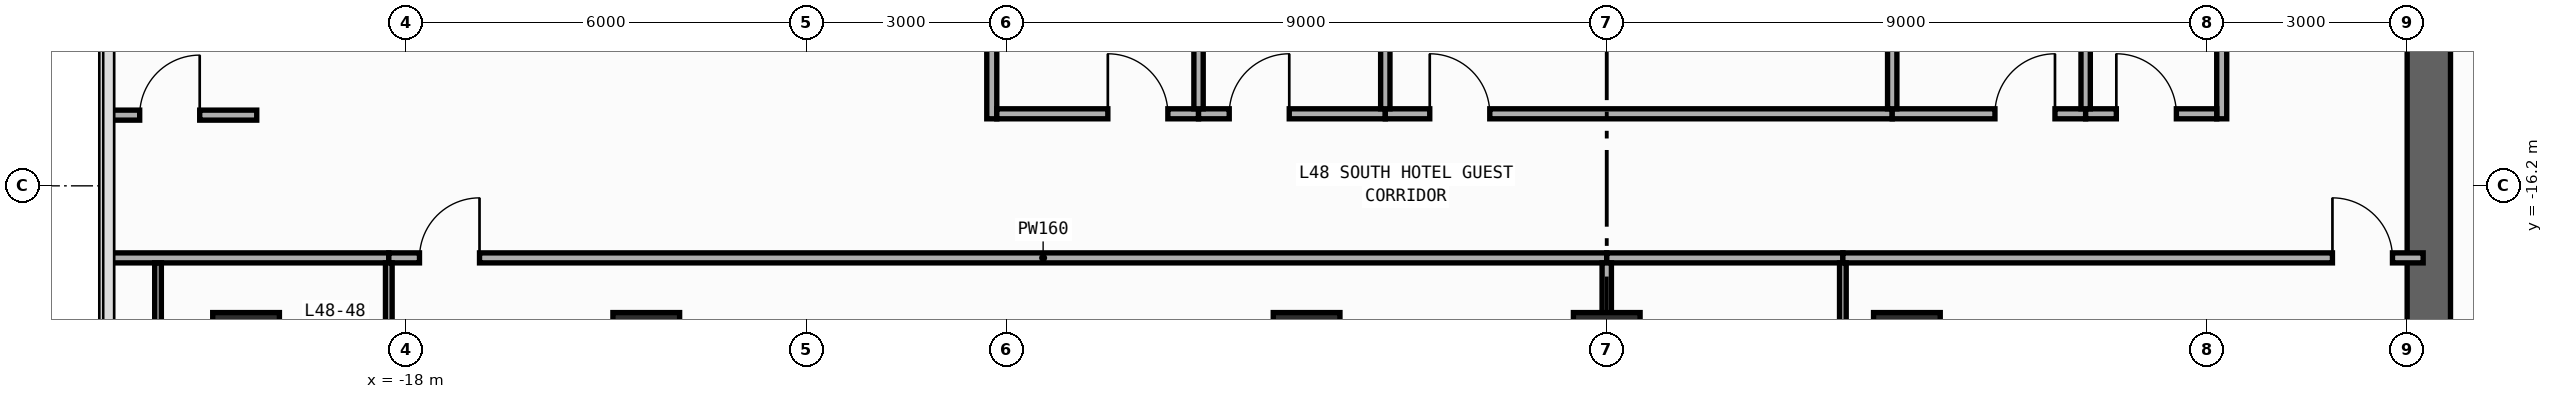
"""IFC4 building model, lengths in metres.
Left out: names, types, materials, properties, quantities, classifications, styles, units other than length and angle.
Written with IfcOpenShell. Run it as: python <this file> out.ifc"""

import sys

from ifc_helpers import new_model, si_unit, direction, frame, frame_2d, origin, origin_2d, place, context, subcontext, project, spatial, rectangle, extrude, element, fill, save


model = new_model("IFC4")
c1 = context("Model", 3, precision=1e-05, world=origin(), true_north=direction((0.0, 1.0)))
c2 = subcontext(c1, "Body", "Model", "MODEL_VIEW")
j1 = project(units=[si_unit("LENGTHUNIT", "METRE"), si_unit("PLANEANGLEUNIT", "RADIAN")], contexts=[c1])
p1 = place(None, origin())
s1 = spatial("IfcSite", under=j1, at=p1, CompositionType="ELEMENT")
p2 = place(p1, origin())
s2 = spatial("IfcBuilding", under=s1, at=p2, CompositionType="ELEMENT")
p3 = place(p2, frame((0.0, 0.0, 206.8)))
s3 = spatial("IfcBuildingStorey", under=s2, at=p3, CompositionType="ELEMENT", Elevation=206.8)
p4 = place(p3, frame((12.325, -19.8, 0.0), z_axis=(0.0, 0.0, 1.0), x_axis=(0.0, 1.0, 0.0)))
e1 = element("IfcWall", 1, at=p4, inside=s3, PredefinedType="SHEAR", context=c2, shape_type="SweptSolid", body=[
    extrude(rectangle(XDim=27.0, YDim=0.65, at=frame_2d((13.5, 0.0))), origin(), (0.0, 0.0, 1.0), 3.54),
])
p5 = place(p4, frame((23.05, 0.0, 0.0)))
e2 = element("IfcOpeningElement", 2, at=p5, cuts=e1, PredefinedType="OPENING", context=c2, shape_type="SweptSolid", body=[
    extrude(rectangle(XDim=1.1, YDim=2.2, at=frame_2d((0.55, 1.1))), frame((0.0, 0.335, 0.0), z_axis=(0.0, -1.0, 0.0), x_axis=(1.0, 0.0, 0.0)), (0.0, 0.0, 1.0), 0.67),
])
p6 = place(p4, frame((19.85, 0.0, 0.0)))
e3 = element("IfcOpeningElement", 3, at=p6, cuts=e1, PredefinedType="OPENING", context=c2, shape_type="SweptSolid", body=[
    extrude(rectangle(XDim=1.1, YDim=2.2, at=frame_2d((0.55, 1.1))), frame((0.0, 0.335, 0.0), z_axis=(0.0, -1.0, 0.0), x_axis=(1.0, 0.0, 0.0)), (0.0, 0.0, 1.0), 0.67),
])
p7 = place(p4, frame((16.65, 0.0, 0.0)))
e4 = element("IfcOpeningElement", 4, at=p7, cuts=e1, PredefinedType="OPENING", context=c2, shape_type="SweptSolid", body=[
    extrude(rectangle(XDim=1.1, YDim=2.2, at=frame_2d((0.55, 1.1))), frame((0.0, 0.335, 0.0), z_axis=(0.0, -1.0, 0.0), x_axis=(1.0, 0.0, 0.0)), (0.0, 0.0, 1.0), 0.67),
])
p8 = place(p4, frame((7.175, 0.0, 0.0)))
e5 = element("IfcOpeningElement", 5, at=p8, cuts=e1, PredefinedType="OPENING", context=c2, shape_type="SweptSolid", body=[
    extrude(rectangle(XDim=0.85, YDim=2.1, at=frame_2d((0.425, 1.05))), frame((0.0, 0.335, 0.0), z_axis=(0.0, -1.0, 0.0), x_axis=(1.0, 0.0, 0.0)), (0.0, 0.0, 1.0), 0.67),
])
p9 = place(p4, frame((10.375, 0.0, 0.0)))
e6 = element("IfcOpeningElement", 6, at=p9, cuts=e1, PredefinedType="OPENING", context=c2, shape_type="SweptSolid", body=[
    extrude(rectangle(XDim=0.85, YDim=2.1, at=frame_2d((0.425, 1.05))), frame((0.0, 0.335, 0.0), z_axis=(0.0, -1.0, 0.0), x_axis=(1.0, 0.0, 0.0)), (0.0, 0.0, 1.0), 0.67),
])
p10 = place(p4, frame((12.725, 0.0, 0.0)))
e7 = element("IfcOpeningElement", 7, at=p10, cuts=e1, PredefinedType="OPENING", context=c2, shape_type="SweptSolid", body=[
    extrude(rectangle(XDim=1.15, YDim=2.2, at=frame_2d((0.575, 1.1))), frame((0.0, 0.335, 0.0), z_axis=(0.0, -1.0, 0.0), x_axis=(1.0, 0.0, 0.0)), (0.0, 0.0, 1.0), 0.67),
])
p11 = place(p4, frame((25.125, 0.0, 0.0)))
e8 = element("IfcOpeningElement", 8, at=p11, cuts=e1, PredefinedType="OPENING", context=c2, shape_type="SweptSolid", body=[
    extrude(rectangle(XDim=0.85, YDim=2.1, at=frame_2d((0.425, 1.05))), frame((0.0, 0.335, 0.0), z_axis=(0.0, -1.0, 0.0), x_axis=(1.0, 0.0, 0.0)), (0.0, 0.0, 1.0), 0.67),
])
for number, where, z_axis, x_axis in (
    (9, (-20.4, -18.6, 0.0), (0.0, 0.0, 1.0), (1.0, 0.0, 0.0)),
    (10, (-14.4, -18.6, 0.0), (0.0, 0.0, 1.0), (1.0, 0.0, 0.0)),
    (11, (-4.5, -18.6, 0.0), (0.0, 0.0, 1.0), (1.0, 0.0, 0.0)),
    (12, (0.0, -18.6, 0.0), (0.0, 0.0, 1.0), (1.0, 0.0, 0.0)),
    (13, (4.5, -18.6, 0.0), (0.0, 0.0, 1.0), (1.0, 0.0, 0.0)),
):
    element("IfcColumn", number, at=place(p3, frame(where, z_axis=z_axis, x_axis=x_axis)), inside=s3, PredefinedType="COLUMN", context=c2, shape_type="SweptSolid", body=[
        extrude(rectangle(XDim=1.0, YDim=1.0, at=origin_2d()), origin(), (0.0, 0.0, 1.0), 3.8),
    ])
p12 = place(p3, frame((-9.22, -15.195, 0.0), z_axis=(0.0, 0.0, 1.0), x_axis=(0.0, 1.0, 0.0)))
e14 = element("IfcWall", 14, at=p12, inside=s3, PredefinedType="PARTITIONING", context=c2, shape_type="SweptSolid", body=[
    extrude(rectangle(XDim=19.395, YDim=0.15, at=frame_2d((9.698, 0.0))), origin(), (0.0, 0.0, 1.0), 2.952),
])
p13 = place(p12, frame((9.348, 0.0, 0.0)))
e15 = element("IfcOpeningElement", 15, at=p13, cuts=e14, PredefinedType="OPENING", context=c2, shape_type="SweptSolid", body=[
    extrude(rectangle(XDim=0.9, YDim=2.15, at=frame_2d((0.45, 1.075))), frame((0.0, 0.085, 0.0), z_axis=(0.0, -1.0, 0.0), x_axis=(1.0, 0.0, 0.0)), (0.0, 0.0, 1.0), 0.17),
])
p14 = place(p3, frame((9.22, -15.195, 0.0), z_axis=(0.0, 0.0, 1.0), x_axis=(0.0, 1.0, 0.0)))
e16 = element("IfcWall", 16, at=p14, inside=s3, PredefinedType="PARTITIONING", context=c2, shape_type="SweptSolid", body=[
    extrude(rectangle(XDim=19.395, YDim=0.15, at=frame_2d((9.698, 0.0))), origin(), (0.0, 0.0, 1.0), 2.952),
])
p15 = place(p14, frame((9.348, 0.0, 0.0)))
e17 = element("IfcOpeningElement", 17, at=p15, cuts=e16, PredefinedType="OPENING", context=c2, shape_type="SweptSolid", body=[
    extrude(rectangle(XDim=0.9, YDim=2.15, at=frame_2d((0.45, 1.075))), frame((0.0, 0.085, 0.0), z_axis=(0.0, -1.0, 0.0), x_axis=(1.0, 0.0, 0.0)), (0.0, 0.0, 1.0), 0.17),
])
p16 = place(p3, frame((-9.145, -15.12, 0.0), z_axis=(0.0, 0.0, 1.0), x_axis=(1.0, 0.0, 0.0)))
e18 = element("IfcWall", 18, at=p16, inside=s3, PredefinedType="PARTITIONING", context=c2, shape_type="SweptSolid", body=[
    extrude(rectangle(XDim=3.025, YDim=0.15, at=frame_2d((1.512, 0.0))), origin(), (0.0, 0.0, 1.0), 3.54),
])
p17 = place(p16, frame((1.665, 0.0, 0.0)))
e19 = element("IfcOpeningElement", 19, at=p17, cuts=e18, PredefinedType="OPENING", context=c2, shape_type="SweptSolid", body=[
    extrude(rectangle(XDim=0.9, YDim=2.15, at=frame_2d((0.45, 1.075))), frame((0.0, 0.085, 0.0), z_axis=(0.0, -1.0, 0.0), x_axis=(1.0, 0.0, 0.0)), (0.0, 0.0, 1.0), 0.17),
])
p18 = place(p3, frame((-6.12, -15.12, 0.0), z_axis=(0.0, 0.0, 1.0), x_axis=(1.0, 0.0, 0.0)))
e20 = element("IfcWall", 20, at=p18, inside=s3, PredefinedType="PARTITIONING", context=c2, shape_type="SweptSolid", body=[
    extrude(rectangle(XDim=2.8, YDim=0.15, at=frame_2d((1.4, 0.0))), origin(), (0.0, 0.0, 1.0), 3.54),
])
p19 = place(p18, frame((0.46, 0.0, 0.0)))
e21 = element("IfcOpeningElement", 21, at=p19, cuts=e20, PredefinedType="OPENING", context=c2, shape_type="SweptSolid", body=[
    extrude(rectangle(XDim=0.9, YDim=2.15, at=frame_2d((0.45, 1.075))), frame((0.0, 0.085, 0.0), z_axis=(0.0, -1.0, 0.0), x_axis=(1.0, 0.0, 0.0)), (0.0, 0.0, 1.0), 0.17),
])
p20 = place(p3, frame((-3.32, -15.12, 0.0), z_axis=(0.0, 0.0, 1.0), x_axis=(1.0, 0.0, 0.0)))
e22 = element("IfcWall", 22, at=p20, inside=s3, PredefinedType="PARTITIONING", context=c2, shape_type="SweptSolid", body=[
    extrude(rectangle(XDim=7.6, YDim=0.15, at=frame_2d((3.8, 0.0))), origin(), (0.0, 0.0, 1.0), 3.54),
])
p21 = place(p20, frame((0.667, 0.0, 0.0)))
e23 = element("IfcOpeningElement", 23, at=p21, cuts=e22, PredefinedType="OPENING", context=c2, shape_type="SweptSolid", body=[
    extrude(rectangle(XDim=0.9, YDim=2.15, at=frame_2d((0.45, 1.075))), frame((0.0, 0.085, 0.0), z_axis=(0.0, -1.0, 0.0), x_axis=(1.0, 0.0, 0.0)), (0.0, 0.0, 1.0), 0.17),
])
p22 = place(p3, frame((4.28, -15.12, 0.0), z_axis=(0.0, 0.0, 1.0), x_axis=(1.0, 0.0, 0.0)))
e24 = element("IfcWall", 24, at=p22, inside=s3, PredefinedType="PARTITIONING", context=c2, shape_type="SweptSolid", body=[
    extrude(rectangle(XDim=2.9, YDim=0.15, at=frame_2d((1.45, 0.0))), origin(), (0.0, 0.0, 1.0), 3.54),
])
p23 = place(p22, frame((1.54, 0.0, 0.0)))
e25 = element("IfcOpeningElement", 25, at=p23, cuts=e24, PredefinedType="OPENING", context=c2, shape_type="SweptSolid", body=[
    extrude(rectangle(XDim=0.9, YDim=2.15, at=frame_2d((0.45, 1.075))), frame((0.0, 0.085, 0.0), z_axis=(0.0, -1.0, 0.0), x_axis=(1.0, 0.0, 0.0)), (0.0, 0.0, 1.0), 0.17),
])
p24 = place(p3, frame((7.18, -15.12, 0.0), z_axis=(0.0, 0.0, 1.0), x_axis=(1.0, 0.0, 0.0)))
e26 = element("IfcWall", 26, at=p24, inside=s3, PredefinedType="PARTITIONING", context=c2, shape_type="SweptSolid", body=[
    extrude(rectangle(XDim=1.965, YDim=0.15, at=frame_2d((0.982, 0.0))), origin(), (0.0, 0.0, 1.0), 3.54),
])
p25 = place(p24, frame((0.46, 0.0, 0.0)))
e27 = element("IfcOpeningElement", 27, at=p25, cuts=e26, PredefinedType="OPENING", context=c2, shape_type="SweptSolid", body=[
    extrude(rectangle(XDim=0.9, YDim=2.15, at=frame_2d((0.45, 1.075))), frame((0.0, 0.085, 0.0), z_axis=(0.0, -1.0, 0.0), x_axis=(1.0, 0.0, 0.0)), (0.0, 0.0, 1.0), 0.17),
])
p26 = place(p3, frame((-22.455, -17.28, 0.0), z_axis=(0.0, 0.0, 1.0), x_axis=(1.0, 0.0, 0.0)))
e28 = element("IfcWall", 28, at=p26, inside=s3, PredefinedType="PARTITIONING", context=c2, shape_type="SweptSolid", body=[
    extrude(rectangle(XDim=4.195, YDim=0.15, at=frame_2d((2.098, 0.0))), origin(), (0.0, 0.0, 1.0), 3.54),
])
p27 = place(p3, frame((-18.26, -17.28, 0.0), z_axis=(0.0, 0.0, 1.0), x_axis=(1.0, 0.0, 0.0)))
e29 = element("IfcWall", 29, at=p27, inside=s3, PredefinedType="PARTITIONING", context=c2, shape_type="SweptSolid", body=[
    extrude(rectangle(XDim=18.26, YDim=0.15, at=frame_2d((9.13, 0.0))), origin(), (0.0, 0.0, 1.0), 3.54),
])
p28 = place(p27, frame((0.46, 0.0, 0.0)))
e30 = element("IfcOpeningElement", 30, at=p28, cuts=e29, PredefinedType="OPENING", context=c2, shape_type="SweptSolid", body=[
    extrude(rectangle(XDim=0.9, YDim=2.15, at=frame_2d((0.45, 1.075))), frame((0.0, 0.085, 0.0), z_axis=(0.0, -1.0, 0.0), x_axis=(1.0, 0.0, 0.0)), (0.0, 0.0, 1.0), 0.17),
])
p29 = place(p3, frame((0.0, -17.28, 0.0), z_axis=(0.0, 0.0, 1.0), x_axis=(1.0, 0.0, 0.0)))
e31 = element("IfcWall", 31, at=p29, inside=s3, PredefinedType="PARTITIONING", context=c2, shape_type="SweptSolid", body=[
    extrude(rectangle(XDim=3.54, YDim=0.15, at=frame_2d((1.77, 0.0))), origin(), (0.0, 0.0, 1.0), 3.54),
])
p30 = place(p3, frame((3.54, -17.28, 0.0), z_axis=(0.0, 0.0, 1.0), x_axis=(1.0, 0.0, 0.0)))
e32 = element("IfcWall", 32, at=p30, inside=s3, PredefinedType="PARTITIONING", context=c2, shape_type="SweptSolid", body=[
    extrude(rectangle(XDim=8.7, YDim=0.15, at=frame_2d((4.35, 0.0))), origin(), (0.0, 0.0, 1.0), 3.54),
])
p31 = place(p30, frame((7.34, 0.0, 0.0)))
e33 = element("IfcOpeningElement", 33, at=p31, cuts=e32, PredefinedType="OPENING", context=c2, shape_type="SweptSolid", body=[
    extrude(rectangle(XDim=0.9, YDim=2.15, at=frame_2d((0.45, 1.075))), frame((0.0, 0.085, 0.0), z_axis=(0.0, -1.0, 0.0), x_axis=(1.0, 0.0, 0.0)), (0.0, 0.0, 1.0), 0.17),
])
p32 = place(p3, frame((-22.455, -15.14, 0.0), z_axis=(0.0, 0.0, 1.0), x_axis=(1.0, 0.0, 0.0)))
e34 = element("IfcWall", 34, at=p32, inside=s3, PredefinedType="PARTITIONING", context=c2, shape_type="SweptSolid", body=[
    extrude(rectangle(XDim=2.215, YDim=0.15, at=frame_2d((1.107, 0.0))), origin(), (0.0, 0.0, 1.0), 3.54),
])
p33 = place(p32, frame((0.46, 0.0, 0.0)))
e35 = element("IfcOpeningElement", 35, at=p33, cuts=e34, PredefinedType="OPENING", context=c2, shape_type="SweptSolid", body=[
    extrude(rectangle(XDim=0.9, YDim=2.15, at=frame_2d((0.45, 1.075))), frame((0.0, 0.085, 0.0), z_axis=(0.0, -1.0, 0.0), x_axis=(1.0, 0.0, 0.0)), (0.0, 0.0, 1.0), 0.17),
])
for number, where, z_axis, x_axis in (
    (36, (-6.12, -15.045, 0.0), (0.0, 0.0, 1.0), (0.0, 1.0, 0.0)),
    (37, (-3.32, -15.045, 0.0), (0.0, 0.0, 1.0), (0.0, 1.0, 0.0)),
):
    element("IfcWall", number, at=place(p3, frame(where, z_axis=z_axis, x_axis=x_axis)), inside=s3, PredefinedType="PARTITIONING", context=c2, shape_type="SweptSolid", body=[
        extrude(rectangle(XDim=19.175, YDim=0.14, at=frame_2d((9.587, 0.0))), origin(), (0.0, 0.0, 1.0), 3.54),
    ])
for number, where, z_axis, x_axis in (
    (38, (4.28, -15.045, 0.0), (0.0, 0.0, 1.0), (0.0, 1.0, 0.0)),
    (39, (7.18, -15.045, 0.0), (0.0, 0.0, 1.0), (0.0, 1.0, 0.0)),
):
    element("IfcWall", number, at=place(p3, frame(where, z_axis=z_axis, x_axis=x_axis)), inside=s3, PredefinedType="PARTITIONING", context=c2, shape_type="SweptSolid", body=[
        extrude(rectangle(XDim=2.885, YDim=0.14, at=frame_2d((1.442, 0.0))), origin(), (0.0, 0.0, 1.0), 3.54),
    ])
p34 = place(p3, frame((-18.26, -20.32, 0.0), z_axis=(0.0, 0.0, 1.0), x_axis=(0.0, 1.0, 0.0)))
e40 = element("IfcWall", 40, at=p34, inside=s3, PredefinedType="PARTITIONING", context=c2, shape_type="SweptSolid", body=[
    extrude(rectangle(XDim=2.965, YDim=0.1, at=frame_2d((1.482, 0.0))), origin(), (0.0, 0.0, 1.0), 3.54),
])
p35 = place(p34, frame((0.46, 0.0, 0.0)))
e41 = element("IfcOpeningElement", 41, at=p35, cuts=e40, PredefinedType="OPENING", context=c2, shape_type="SweptSolid", body=[
    extrude(rectangle(XDim=0.8, YDim=2.1, at=frame_2d((0.4, 1.05))), frame((0.0, 0.06, 0.0), z_axis=(0.0, -1.0, 0.0), x_axis=(1.0, 0.0, 0.0)), (0.0, 0.0, 1.0), 0.12),
])
p36 = place(p3, frame((0.0, -20.37, 0.0), z_axis=(0.0, 0.0, 1.0), x_axis=(0.0, 1.0, 0.0)))
e42 = element("IfcWall", 42, at=p36, inside=s3, PredefinedType="PARTITIONING", context=c2, shape_type="SweptSolid", body=[
    extrude(rectangle(XDim=3.015, YDim=0.14, at=frame_2d((1.508, 0.0))), origin(), (0.0, 0.0, 1.0), 3.54),
])
for number, where, z_axis, x_axis in (
    (43, (3.54, -20.32, 0.0), (0.0, 0.0, 1.0), (0.0, 1.0, 0.0)),
    (44, (-21.72, -20.32, 0.0), (0.0, 0.0, 1.0), (0.0, 1.0, 0.0)),
):
    element("IfcWall", number, at=place(p3, frame(where, z_axis=z_axis, x_axis=x_axis)), inside=s3, PredefinedType="PARTITIONING", context=c2, shape_type="SweptSolid", body=[
        extrude(rectangle(XDim=2.965, YDim=0.1, at=frame_2d((1.482, 0.0))), origin(), (0.0, 0.0, 1.0), 3.54),
    ])
p37 = place(p17, origin())
e45 = element("IfcDoor", 45, at=p37, inside=s3, OperationType="SINGLE_SWING_LEFT", PredefinedType="DOOR", context=c2, shape_type="SweptSolid", body=[
    extrude(rectangle(XDim=0.9, YDim=2.15, at=frame_2d((0.45, 1.075))), frame((0.0, 0.025, 0.0), z_axis=(0.0, -1.0, 0.0), x_axis=(1.0, 0.0, 0.0)), (0.0, 0.0, 1.0), 0.05),
])
fill(e19, e45)
p38 = place(p19, origin())
e46 = element("IfcDoor", 46, at=p38, inside=s3, OperationType="SINGLE_SWING_RIGHT", PredefinedType="DOOR", context=c2, shape_type="SweptSolid", body=[
    extrude(rectangle(XDim=0.9, YDim=2.15, at=frame_2d((0.45, 1.075))), frame((0.0, 0.025, 0.0), z_axis=(0.0, -1.0, 0.0), x_axis=(1.0, 0.0, 0.0)), (0.0, 0.0, 1.0), 0.05),
])
fill(e21, e46)
p39 = place(p21, origin())
e47 = element("IfcDoor", 47, at=p39, inside=s3, OperationType="SINGLE_SWING_LEFT", PredefinedType="DOOR", context=c2, shape_type="SweptSolid", body=[
    extrude(rectangle(XDim=0.9, YDim=2.15, at=frame_2d((0.45, 1.075))), frame((0.0, 0.025, 0.0), z_axis=(0.0, -1.0, 0.0), x_axis=(1.0, 0.0, 0.0)), (0.0, 0.0, 1.0), 0.05),
])
fill(e23, e47)
p40 = place(p23, origin())
e48 = element("IfcDoor", 48, at=p40, inside=s3, OperationType="SINGLE_SWING_RIGHT", PredefinedType="DOOR", context=c2, shape_type="SweptSolid", body=[
    extrude(rectangle(XDim=0.9, YDim=2.15, at=frame_2d((0.45, 1.075))), frame((0.0, 0.025, 0.0), z_axis=(0.0, -1.0, 0.0), x_axis=(1.0, 0.0, 0.0)), (0.0, 0.0, 1.0), 0.05),
])
fill(e25, e48)
p41 = place(p25, origin())
e49 = element("IfcDoor", 49, at=p41, inside=s3, OperationType="SINGLE_SWING_LEFT", PredefinedType="DOOR", context=c2, shape_type="SweptSolid", body=[
    extrude(rectangle(XDim=0.9, YDim=2.15, at=frame_2d((0.45, 1.075))), frame((0.0, 0.025, 0.0), z_axis=(0.0, -1.0, 0.0), x_axis=(1.0, 0.0, 0.0)), (0.0, 0.0, 1.0), 0.05),
])
fill(e27, e49)
p42 = place(p28, origin())
e50 = element("IfcDoor", 50, at=p42, inside=s3, OperationType="SINGLE_SWING_RIGHT", PredefinedType="DOOR", context=c2, shape_type="SweptSolid", body=[
    extrude(rectangle(XDim=0.9, YDim=2.15, at=frame_2d((0.45, 1.075))), frame((0.0, 0.025, 0.0), z_axis=(0.0, -1.0, 0.0), x_axis=(1.0, 0.0, 0.0)), (0.0, 0.0, 1.0), 0.05),
])
fill(e30, e50)
p43 = place(p31, origin())
e51 = element("IfcDoor", 51, at=p43, inside=s3, OperationType="SINGLE_SWING_LEFT", PredefinedType="DOOR", context=c2, shape_type="SweptSolid", body=[
    extrude(rectangle(XDim=0.9, YDim=2.15, at=frame_2d((0.45, 1.075))), frame((0.0, 0.025, 0.0), z_axis=(0.0, -1.0, 0.0), x_axis=(1.0, 0.0, 0.0)), (0.0, 0.0, 1.0), 0.05),
])
fill(e33, e51)
p44 = place(p33, origin())
e52 = element("IfcDoor", 52, at=p44, inside=s3, OperationType="SINGLE_SWING_RIGHT", PredefinedType="DOOR", context=c2, shape_type="SweptSolid", body=[
    extrude(rectangle(XDim=0.9, YDim=2.15, at=frame_2d((0.45, 1.075))), frame((0.0, 0.025, 0.0), z_axis=(0.0, -1.0, 0.0), x_axis=(1.0, 0.0, 0.0)), (0.0, 0.0, 1.0), 0.05),
])
fill(e35, e52)
save(model, sys.argv[1])
